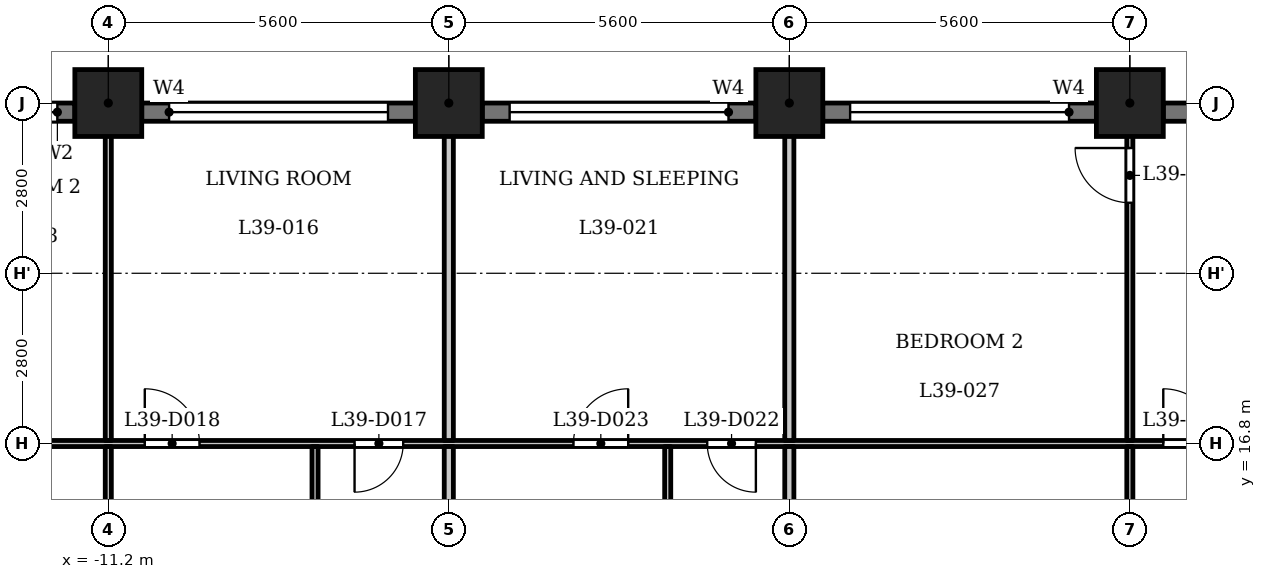
"""IFC4 building model, lengths in metres.
Left out: names, types, materials, properties, quantities, classifications, styles, units other than length and angle.
Written with IfcOpenShell. Run it as: python <this file> out.ifc"""

import sys

from ifc_helpers import new_model, si_unit, direction, frame, frame_2d, origin, origin_2d, place, context, subcontext, project, spatial, rectangle, extrude, element, fill, save


model = new_model("IFC4")
c1 = context("Model", 3, precision=1e-05, world=origin(), true_north=direction((0.0, 1.0)))
c2 = subcontext(c1, "Body", "Model", "MODEL_VIEW")
j1 = project(units=[si_unit("LENGTHUNIT", "METRE"), si_unit("PLANEANGLEUNIT", "RADIAN")], contexts=[c1])
p1 = place(None, origin())
s1 = spatial("IfcSite", under=j1, at=p1, CompositionType="ELEMENT")
p2 = place(p1, origin())
s2 = spatial("IfcBuilding", under=s1, at=p2, CompositionType="ELEMENT")
p3 = place(p2, frame((0.0, 0.0, 153.6)))
s3 = spatial("IfcBuildingStorey", under=s2, at=p3, CompositionType="ELEMENT", Elevation=153.6)
for number, where, z_axis, x_axis in (
    (1, (5.6, 22.4, 0.0), (0.0, 0.0, 1.0), (1.0, 0.0, 0.0)),
    (2, (0.0, 22.4, 0.0), (0.0, 0.0, 1.0), (1.0, 0.0, 0.0)),
    (3, (-5.6, 22.4, 0.0), (0.0, 0.0, 1.0), (1.0, 0.0, 0.0)),
    (4, (-11.2, 22.4, 0.0), (0.0, 0.0, 1.0), (1.0, 0.0, 0.0)),
):
    element("IfcColumn", number, at=place(p3, frame(where, z_axis=z_axis, x_axis=x_axis)), inside=s3, PredefinedType="COLUMN", context=c2, shape_type="SweptSolid", body=[
        extrude(rectangle(XDim=1.1, YDim=1.1, at=origin_2d()), origin(), (0.0, 0.0, 1.0), 3.5),
    ])
p4 = place(p3, frame((10.65, 22.25, 0.0), z_axis=(0.0, 0.0, 1.0), x_axis=(-1.0, 0.0, 0.0)))
e5 = element("IfcWall", 5, at=p4, inside=s3, PredefinedType="SOLIDWALL", context=c2, shape_type="SweptSolid", body=[
    extrude(rectangle(XDim=4.5, YDim=0.3, at=frame_2d((2.25, 0.0))), origin(), (0.0, 0.0, 1.0), 2.45),
])
p5 = place(p4, frame((0.45, 0.0, 1.2)))
e6 = element("IfcOpeningElement", 6, at=p5, cuts=e5, PredefinedType="OPENING", context=c2, shape_type="SweptSolid", body=[
    extrude(rectangle(XDim=3.6, YDim=0.95, at=frame_2d((1.8, 0.475))), frame((0.0, 0.16, 0.0), z_axis=(0.0, -1.0, 0.0), x_axis=(1.0, 0.0, 0.0)), (0.0, 0.0, 1.0), 0.32),
])
p6 = place(p3, frame((5.05, 22.25, 0.0), z_axis=(0.0, 0.0, 1.0), x_axis=(-1.0, 0.0, 0.0)))
e7 = element("IfcWall", 7, at=p6, inside=s3, PredefinedType="SOLIDWALL", context=c2, shape_type="SweptSolid", body=[
    extrude(rectangle(XDim=4.5, YDim=0.3, at=frame_2d((2.25, 0.0))), origin(), (0.0, 0.0, 1.0), 2.45),
])
p7 = place(p6, frame((0.45, 0.0, 1.2)))
e8 = element("IfcOpeningElement", 8, at=p7, cuts=e7, PredefinedType="OPENING", context=c2, shape_type="SweptSolid", body=[
    extrude(rectangle(XDim=3.6, YDim=0.95, at=frame_2d((1.8, 0.475))), frame((0.0, 0.16, 0.0), z_axis=(0.0, -1.0, 0.0), x_axis=(1.0, 0.0, 0.0)), (0.0, 0.0, 1.0), 0.32),
])
p8 = place(p3, frame((-0.55, 22.25, 0.0), z_axis=(0.0, 0.0, 1.0), x_axis=(-1.0, 0.0, 0.0)))
e9 = element("IfcWall", 9, at=p8, inside=s3, PredefinedType="SOLIDWALL", context=c2, shape_type="SweptSolid", body=[
    extrude(rectangle(XDim=4.5, YDim=0.3, at=frame_2d((2.25, 0.0))), origin(), (0.0, 0.0, 1.0), 2.45),
])
p9 = place(p8, frame((0.45, 0.0, 1.2)))
e10 = element("IfcOpeningElement", 10, at=p9, cuts=e9, PredefinedType="OPENING", context=c2, shape_type="SweptSolid", body=[
    extrude(rectangle(XDim=3.6, YDim=0.95, at=frame_2d((1.8, 0.475))), frame((0.0, 0.16, 0.0), z_axis=(0.0, -1.0, 0.0), x_axis=(1.0, 0.0, 0.0)), (0.0, 0.0, 1.0), 0.32),
])
p10 = place(p3, frame((-6.15, 22.25, 0.0), z_axis=(0.0, 0.0, 1.0), x_axis=(-1.0, 0.0, 0.0)))
e11 = element("IfcWall", 11, at=p10, inside=s3, PredefinedType="SOLIDWALL", context=c2, shape_type="SweptSolid", body=[
    extrude(rectangle(XDim=4.5, YDim=0.3, at=frame_2d((2.25, 0.0))), origin(), (0.0, 0.0, 1.0), 2.45),
])
p11 = place(p10, frame((0.45, 0.0, 1.2)))
e12 = element("IfcOpeningElement", 12, at=p11, cuts=e11, PredefinedType="OPENING", context=c2, shape_type="SweptSolid", body=[
    extrude(rectangle(XDim=3.6, YDim=0.95, at=frame_2d((1.8, 0.475))), frame((0.0, 0.16, 0.0), z_axis=(0.0, -1.0, 0.0), x_axis=(1.0, 0.0, 0.0)), (0.0, 0.0, 1.0), 0.32),
])
p12 = place(p3, frame((-11.75, 22.25, 0.0), z_axis=(0.0, 0.0, 1.0), x_axis=(-1.0, 0.0, 0.0)))
e13 = element("IfcWall", 13, at=p12, inside=s3, PredefinedType="SOLIDWALL", context=c2, shape_type="SweptSolid", body=[
    extrude(rectangle(XDim=4.5, YDim=0.3, at=frame_2d((2.25, 0.0))), origin(), (0.0, 0.0, 1.0), 2.45),
])
p13 = place(p12, frame((0.288, 0.0, 0.9)))
e14 = element("IfcOpeningElement", 14, at=p13, cuts=e13, PredefinedType="OPENING", context=c2, shape_type="SweptSolid", body=[
    extrude(rectangle(XDim=1.8, YDim=1.25, at=frame_2d((0.9, 0.625))), frame((0.0, 0.16, 0.0), z_axis=(0.0, -1.0, 0.0), x_axis=(1.0, 0.0, 0.0)), (0.0, 0.0, 1.0), 0.32),
])
p14 = place(p12, frame((2.913, 0.0, 0.6)))
e15 = element("IfcOpeningElement", 15, at=p14, cuts=e13, PredefinedType="OPENING", context=c2, shape_type="SweptSolid", body=[
    extrude(rectangle(XDim=1.2, YDim=1.55, at=frame_2d((0.6, 0.775))), frame((0.0, 0.16, 0.0), z_axis=(0.0, -1.0, 0.0), x_axis=(1.0, 0.0, 0.0)), (0.0, 0.0, 1.0), 0.32),
])
p15 = place(p3, frame((-16.725, 16.8, 0.0), z_axis=(0.0, 0.0, 1.0), x_axis=(1.0, 0.0, 0.0)))
e16 = element("IfcWall", 16, at=p15, inside=s3, PredefinedType="PARTITIONING", context=c2, shape_type="SweptSolid", body=[
    extrude(rectangle(XDim=33.45, YDim=0.1, at=frame_2d((16.725, 0.0))), origin(), (0.0, 0.0, 1.0), 3.2),
])
p16 = place(p15, frame((9.575, 0.0, 0.0)))
e17 = element("IfcOpeningElement", 17, at=p16, cuts=e16, PredefinedType="OPENING", context=c2, shape_type="SweptSolid", body=[
    extrude(rectangle(XDim=0.8, YDim=2.1, at=frame_2d((0.4, 1.05))), frame((0.0, 0.06, 0.0), z_axis=(0.0, -1.0, 0.0), x_axis=(1.0, 0.0, 0.0)), (0.0, 0.0, 1.0), 0.12),
])
p17 = place(p15, frame((6.125, 0.0, 0.0)))
e18 = element("IfcOpeningElement", 18, at=p17, cuts=e16, PredefinedType="OPENING", context=c2, shape_type="SweptSolid", body=[
    extrude(rectangle(XDim=0.9, YDim=2.1, at=frame_2d((0.45, 1.05))), frame((0.0, 0.06, 0.0), z_axis=(0.0, -1.0, 0.0), x_axis=(1.0, 0.0, 0.0)), (0.0, 0.0, 1.0), 0.12),
])
p18 = place(p15, frame((0.975, 0.0, 0.0)))
e19 = element("IfcOpeningElement", 19, at=p18, cuts=e16, PredefinedType="OPENING", context=c2, shape_type="SweptSolid", body=[
    extrude(rectangle(XDim=0.9, YDim=2.1, at=frame_2d((0.45, 1.05))), frame((0.0, 0.06, 0.0), z_axis=(0.0, -1.0, 0.0), x_axis=(1.0, 0.0, 0.0)), (0.0, 0.0, 1.0), 0.12),
])
p19 = place(p15, frame((3.225, 0.0, 0.0)))
e20 = element("IfcOpeningElement", 20, at=p19, cuts=e16, PredefinedType="OPENING", context=c2, shape_type="SweptSolid", body=[
    extrude(rectangle(XDim=0.9, YDim=2.1, at=frame_2d((0.45, 1.05))), frame((0.0, 0.06, 0.0), z_axis=(0.0, -1.0, 0.0), x_axis=(1.0, 0.0, 0.0)), (0.0, 0.0, 1.0), 0.12),
])
p20 = place(p15, frame((15.375, 0.0, 0.0)))
e21 = element("IfcOpeningElement", 21, at=p20, cuts=e16, PredefinedType="OPENING", context=c2, shape_type="SweptSolid", body=[
    extrude(rectangle(XDim=0.8, YDim=2.1, at=frame_2d((0.4, 1.05))), frame((0.0, 0.06, 0.0), z_axis=(0.0, -1.0, 0.0), x_axis=(1.0, 0.0, 0.0)), (0.0, 0.0, 1.0), 0.12),
])
p21 = place(p15, frame((13.175, 0.0, 0.0)))
e22 = element("IfcOpeningElement", 22, at=p21, cuts=e16, PredefinedType="OPENING", context=c2, shape_type="SweptSolid", body=[
    extrude(rectangle(XDim=0.9, YDim=2.1, at=frame_2d((0.45, 1.05))), frame((0.0, 0.06, 0.0), z_axis=(0.0, -1.0, 0.0), x_axis=(1.0, 0.0, 0.0)), (0.0, 0.0, 1.0), 0.12),
])
p22 = place(p15, frame((31.975, 0.0, 0.0)))
e23 = element("IfcOpeningElement", 23, at=p22, cuts=e16, PredefinedType="OPENING", context=c2, shape_type="SweptSolid", body=[
    extrude(rectangle(XDim=0.9, YDim=2.1, at=frame_2d((0.45, 1.05))), frame((0.0, 0.06, 0.0), z_axis=(0.0, -1.0, 0.0), x_axis=(1.0, 0.0, 0.0)), (0.0, 0.0, 1.0), 0.12),
])
p23 = place(p15, frame((22.875, 0.0, 0.0)))
e24 = element("IfcOpeningElement", 24, at=p23, cuts=e16, PredefinedType="OPENING", context=c2, shape_type="SweptSolid", body=[
    extrude(rectangle(XDim=0.9, YDim=2.1, at=frame_2d((0.45, 1.05))), frame((0.0, 0.06, 0.0), z_axis=(0.0, -1.0, 0.0), x_axis=(1.0, 0.0, 0.0)), (0.0, 0.0, 1.0), 0.12),
])
p24 = place(p3, frame((-11.2, 13.275, 0.0), z_axis=(0.0, 0.0, 1.0), x_axis=(0.0, 1.0, 0.0)))
e25 = element("IfcWall", 25, at=p24, inside=s3, PredefinedType="PARTITIONING", context=c2, shape_type="SweptSolid", body=[
    extrude(rectangle(XDim=3.475, YDim=0.1, at=frame_2d((1.738, 0.0))), origin(), (0.0, 0.0, 1.0), 3.2),
])
p25 = place(p24, frame((0.576, 0.0, 0.0)))
e26 = element("IfcOpeningElement", 26, at=p25, cuts=e25, PredefinedType="OPENING", context=c2, shape_type="SweptSolid", body=[
    extrude(rectangle(XDim=0.9, YDim=2.1, at=frame_2d((0.45, 1.05))), frame((0.0, 0.06, 0.0), z_axis=(0.0, -1.0, 0.0), x_axis=(1.0, 0.0, 0.0)), (0.0, 0.0, 1.0), 0.12),
])
p26 = place(p3, frame((-11.2, 16.85, 0.0), z_axis=(0.0, 0.0, 1.0), x_axis=(0.0, 1.0, 0.0)))
e27 = element("IfcWall", 27, at=p26, inside=s3, PredefinedType="PARTITIONING", context=c2, shape_type="SweptSolid", body=[
    extrude(rectangle(XDim=6.08, YDim=0.1, at=frame_2d((3.04, 0.0))), origin(), (0.0, 0.0, 1.0), 3.2),
])
p27 = place(p3, frame((-7.8, 13.275, 0.0), z_axis=(0.0, 0.0, 1.0), x_axis=(0.0, 1.0, 0.0)))
e28 = element("IfcWall", 28, at=p27, inside=s3, PredefinedType="PARTITIONING", context=c2, shape_type="SweptSolid", body=[
    extrude(rectangle(XDim=3.475, YDim=0.1, at=frame_2d((1.738, 0.0))), origin(), (0.0, 0.0, 1.0), 3.2),
])
p28 = place(p3, frame((-5.6, 13.275, 0.0), z_axis=(0.0, 0.0, 1.0), x_axis=(0.0, 1.0, 0.0)))
e29 = element("IfcWall", 29, at=p28, inside=s3, PredefinedType="PARTITIONING", context=c2, shape_type="SweptSolid", body=[
    extrude(rectangle(XDim=3.475, YDim=0.15, at=frame_2d((1.738, 0.0))), origin(), (0.0, 0.0, 1.0), 3.2),
])
p29 = place(p3, frame((-5.6, 16.85, 0.0), z_axis=(0.0, 0.0, 1.0), x_axis=(0.0, 1.0, 0.0)))
e30 = element("IfcWall", 30, at=p29, inside=s3, PredefinedType="PARTITIONING", context=c2, shape_type="SweptSolid", body=[
    extrude(rectangle(XDim=6.08, YDim=0.15, at=frame_2d((3.04, 0.0))), origin(), (0.0, 0.0, 1.0), 3.2),
])
p30 = place(p3, frame((-2.0, 13.275, 0.0), z_axis=(0.0, 0.0, 1.0), x_axis=(0.0, 1.0, 0.0)))
e31 = element("IfcWall", 31, at=p30, inside=s3, PredefinedType="PARTITIONING", context=c2, shape_type="SweptSolid", body=[
    extrude(rectangle(XDim=3.475, YDim=0.1, at=frame_2d((1.738, 0.0))), origin(), (0.0, 0.0, 1.0), 3.2),
])
p31 = place(p3, frame((0.0, 13.275, 0.0), z_axis=(0.0, 0.0, 1.0), x_axis=(0.0, 1.0, 0.0)))
e32 = element("IfcWall", 32, at=p31, inside=s3, PredefinedType="PARTITIONING", context=c2, shape_type="SweptSolid", body=[
    extrude(rectangle(XDim=3.475, YDim=0.15, at=frame_2d((1.738, 0.0))), origin(), (0.0, 0.0, 1.0), 3.2),
])
p32 = place(p3, frame((0.0, 16.85, 0.0), z_axis=(0.0, 0.0, 1.0), x_axis=(0.0, 1.0, 0.0)))
e33 = element("IfcWall", 33, at=p32, inside=s3, PredefinedType="PARTITIONING", context=c2, shape_type="SweptSolid", body=[
    extrude(rectangle(XDim=6.08, YDim=0.15, at=frame_2d((3.04, 0.0))), origin(), (0.0, 0.0, 1.0), 3.2),
])
p33 = place(p3, frame((5.6, 13.275, 0.0), z_axis=(0.0, 0.0, 1.0), x_axis=(0.0, 1.0, 0.0)))
e34 = element("IfcWall", 34, at=p33, inside=s3, PredefinedType="PARTITIONING", context=c2, shape_type="SweptSolid", body=[
    extrude(rectangle(XDim=3.475, YDim=0.1, at=frame_2d((1.738, 0.0))), origin(), (0.0, 0.0, 1.0), 3.2),
])
p34 = place(p33, frame((0.575, 0.0, 0.0)))
e35 = element("IfcOpeningElement", 35, at=p34, cuts=e34, PredefinedType="OPENING", context=c2, shape_type="SweptSolid", body=[
    extrude(rectangle(XDim=0.8, YDim=2.1, at=frame_2d((0.4, 1.05))), frame((0.0, 0.06, 0.0), z_axis=(0.0, -1.0, 0.0), x_axis=(1.0, 0.0, 0.0)), (0.0, 0.0, 1.0), 0.12),
])
p35 = place(p3, frame((5.6, 16.85, 0.0), z_axis=(0.0, 0.0, 1.0), x_axis=(0.0, 1.0, 0.0)))
e36 = element("IfcWall", 36, at=p35, inside=s3, PredefinedType="PARTITIONING", context=c2, shape_type="SweptSolid", body=[
    extrude(rectangle(XDim=6.08, YDim=0.1, at=frame_2d((3.04, 0.0))), origin(), (0.0, 0.0, 1.0), 3.2),
])
p36 = place(p35, frame((3.91, 0.0, 0.0)))
e37 = element("IfcOpeningElement", 37, at=p36, cuts=e36, PredefinedType="OPENING", context=c2, shape_type="SweptSolid", body=[
    extrude(rectangle(XDim=0.9, YDim=2.1, at=frame_2d((0.45, 1.05))), frame((0.0, 0.06, 0.0), z_axis=(0.0, -1.0, 0.0), x_axis=(1.0, 0.0, 0.0)), (0.0, 0.0, 1.0), 0.12),
])
p37 = place(p16, origin())
e38 = element("IfcDoor", 38, at=p37, inside=s3, OperationType="SINGLE_SWING_LEFT", PredefinedType="DOOR", context=c2, shape_type="SweptSolid", body=[
    extrude(rectangle(XDim=0.8, YDim=2.1, at=frame_2d((0.4, 1.05))), frame((0.0, 0.025, 0.0), z_axis=(0.0, -1.0, 0.0), x_axis=(1.0, 0.0, 0.0)), (0.0, 0.0, 1.0), 0.05),
])
fill(e17, e38)
p38 = place(p17, origin())
e39 = element("IfcDoor", 39, at=p38, inside=s3, OperationType="SINGLE_SWING_RIGHT", PredefinedType="DOOR", context=c2, shape_type="SweptSolid", body=[
    extrude(rectangle(XDim=0.9, YDim=2.1, at=frame_2d((0.45, 1.05))), frame((0.0, 0.025, 0.0), z_axis=(0.0, -1.0, 0.0), x_axis=(1.0, 0.0, 0.0)), (0.0, 0.0, 1.0), 0.05),
])
fill(e18, e39)
p39 = place(p20, origin())
e40 = element("IfcDoor", 40, at=p39, inside=s3, OperationType="SINGLE_SWING_RIGHT", PredefinedType="DOOR", context=c2, shape_type="SweptSolid", body=[
    extrude(rectangle(XDim=0.8, YDim=2.1, at=frame_2d((0.4, 1.05))), frame((0.0, 0.025, 0.0), z_axis=(0.0, -1.0, 0.0), x_axis=(1.0, 0.0, 0.0)), (0.0, 0.0, 1.0), 0.05),
])
fill(e21, e40)
p40 = place(p21, origin())
e41 = element("IfcDoor", 41, at=p40, inside=s3, OperationType="SINGLE_SWING_LEFT", PredefinedType="DOOR", context=c2, shape_type="SweptSolid", body=[
    extrude(rectangle(XDim=0.9, YDim=2.1, at=frame_2d((0.45, 1.05))), frame((0.0, 0.025, 0.0), z_axis=(0.0, -1.0, 0.0), x_axis=(1.0, 0.0, 0.0)), (0.0, 0.0, 1.0), 0.05),
])
fill(e22, e41)
p41 = place(p23, origin())
e42 = element("IfcDoor", 42, at=p41, inside=s3, OperationType="SINGLE_SWING_RIGHT", PredefinedType="DOOR", context=c2, shape_type="SweptSolid", body=[
    extrude(rectangle(XDim=0.9, YDim=2.1, at=frame_2d((0.45, 1.05))), frame((0.0, 0.025, 0.0), z_axis=(0.0, -1.0, 0.0), x_axis=(1.0, 0.0, 0.0)), (0.0, 0.0, 1.0), 0.05),
])
fill(e24, e42)
p42 = place(p36, origin())
e43 = element("IfcDoor", 43, at=p42, inside=s3, OperationType="SINGLE_SWING_LEFT", PredefinedType="DOOR", context=c2, shape_type="SweptSolid", body=[
    extrude(rectangle(XDim=0.9, YDim=2.1, at=frame_2d((0.45, 1.05))), frame((0.0, 0.025, 0.0), z_axis=(0.0, -1.0, 0.0), x_axis=(1.0, 0.0, 0.0)), (0.0, 0.0, 1.0), 0.05),
])
fill(e37, e43)
p43 = place(p7, origin())
e44 = element("IfcWindow", 44, at=p43, inside=s3, PartitioningType="SINGLE_PANEL", PredefinedType="WINDOW", context=c2, shape_type="SweptSolid", body=[
    extrude(rectangle(XDim=3.6, YDim=0.95, at=frame_2d((1.8, 0.475))), frame((0.0, 0.03, 0.0), z_axis=(0.0, -1.0, 0.0), x_axis=(1.0, 0.0, 0.0)), (0.0, 0.0, 1.0), 0.06),
])
fill(e8, e44)
p44 = place(p9, origin())
e45 = element("IfcWindow", 45, at=p44, inside=s3, PartitioningType="SINGLE_PANEL", PredefinedType="WINDOW", context=c2, shape_type="SweptSolid", body=[
    extrude(rectangle(XDim=3.6, YDim=0.95, at=frame_2d((1.8, 0.475))), frame((0.0, 0.03, 0.0), z_axis=(0.0, -1.0, 0.0), x_axis=(1.0, 0.0, 0.0)), (0.0, 0.0, 1.0), 0.06),
])
fill(e10, e45)
p45 = place(p11, origin())
e46 = element("IfcWindow", 46, at=p45, inside=s3, PartitioningType="SINGLE_PANEL", PredefinedType="WINDOW", context=c2, shape_type="SweptSolid", body=[
    extrude(rectangle(XDim=3.6, YDim=0.95, at=frame_2d((1.8, 0.475))), frame((0.0, 0.03, 0.0), z_axis=(0.0, -1.0, 0.0), x_axis=(1.0, 0.0, 0.0)), (0.0, 0.0, 1.0), 0.06),
])
fill(e12, e46)
p46 = place(p13, origin())
e47 = element("IfcWindow", 47, at=p46, inside=s3, PartitioningType="SINGLE_PANEL", PredefinedType="WINDOW", context=c2, shape_type="SweptSolid", body=[
    extrude(rectangle(XDim=1.8, YDim=1.25, at=frame_2d((0.9, 0.625))), frame((0.0, 0.03, 0.0), z_axis=(0.0, -1.0, 0.0), x_axis=(1.0, 0.0, 0.0)), (0.0, 0.0, 1.0), 0.06),
])
fill(e14, e47)
save(model, sys.argv[1])
